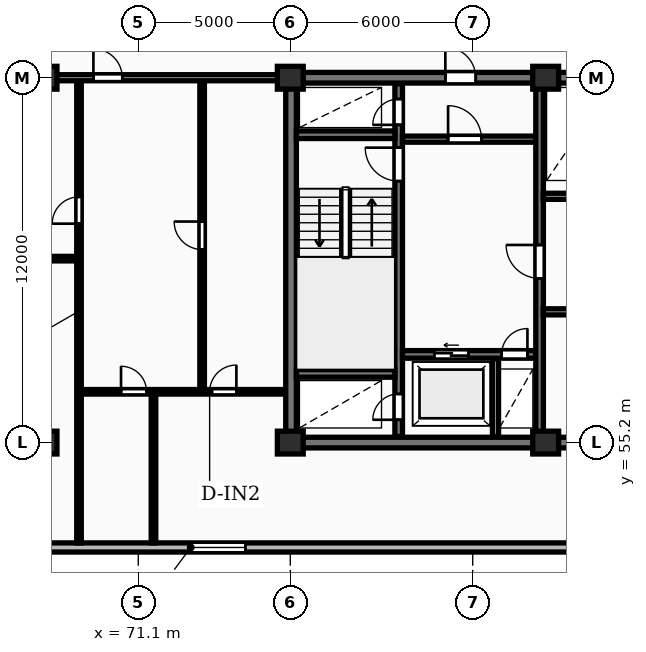
"""IFC4 building model, lengths in metres.
Left out: names, types, materials, properties, quantities, classifications, styles, units other than length and angle.
Written with IfcOpenShell. Run it as: python <this file> out.ifc"""

import sys

from ifc_helpers import new_model, si_unit, direction, frame, frame_2d, origin, origin_2d, place, context, subcontext, project, spatial, rectangle, extrude, element, fill, save


model = new_model("IFC4")
c1 = context("Model", 3, precision=1e-05, world=origin(), true_north=direction((0.0, 1.0)))
c2 = subcontext(c1, "Body", "Model", "MODEL_VIEW")
j1 = project(units=[si_unit("LENGTHUNIT", "METRE"), si_unit("PLANEANGLEUNIT", "RADIAN")], contexts=[c1])
p1 = place(None, origin())
s1 = spatial("IfcSite", under=j1, at=p1, CompositionType="ELEMENT")
p2 = place(p1, origin())
s2 = spatial("IfcBuilding", under=s1, at=p2, CompositionType="ELEMENT")
p3 = place(p2, frame((0.0, 0.0, 201.1)))
s3 = spatial("IfcBuildingStorey", under=s2, at=p3, CompositionType="ELEMENT", Elevation=201.1)
for number, where, z_axis, x_axis in (
    (1, (68.0, 55.2, 0.0), (0.0, 0.0, 1.0), (1.0, 0.0, 0.0)),
    (2, (68.0, 67.2, 0.0), (0.0, 0.0, 1.0), (1.0, 0.0, 0.0)),
    (3, (76.1, 55.2, 0.0), (0.0, 0.0, 1.0), (1.0, 0.0, 0.0)),
    (4, (76.1, 67.2, 0.0), (0.0, 0.0, 1.0), (1.0, 0.0, 0.0)),
    (5, (84.5, 55.2, 0.0), (0.0, 0.0, 1.0), (1.0, 0.0, 0.0)),
    (6, (84.5, 67.2, 0.0), (0.0, 0.0, 1.0), (1.0, 0.0, 0.0)),
):
    element("IfcColumn", number, at=place(p3, frame(where, z_axis=z_axis, x_axis=x_axis)), inside=s3, PredefinedType="COLUMN", context=c2, shape_type="SweptSolid", body=[
        extrude(rectangle(XDim=0.85, YDim=0.75, at=origin_2d()), origin(), (0.0, 0.0, 1.0), 3.25),
    ])
p4 = place(p3, frame((59.8, 51.75, 0.0), z_axis=(0.0, 0.0, 1.0), x_axis=(1.0, 0.0, 0.0)))
e7 = element("IfcWall", 7, at=p4, inside=s3, PredefinedType="STANDARD", context=c2, shape_type="SweptSolid", body=[
    extrude(rectangle(XDim=68.6, YDim=0.3, at=frame_2d((34.3, 0.0))), origin(), (0.0, 0.0, 1.0), 2.97),
])
p5 = place(p4, frame((13.025, 0.0, 0.85)))
e8 = element("IfcOpeningElement", 8, at=p5, cuts=e7, PredefinedType="OPENING", context=c2, shape_type="SweptSolid", body=[
    extrude(rectangle(XDim=1.8, YDim=1.8, at=frame_2d((0.9, 0.9))), frame((0.0, 0.16, 0.0), z_axis=(0.0, -1.0, 0.0), x_axis=(1.0, 0.0, 0.0)), (0.0, 0.0, 1.0), 0.32),
])
p6 = place(p4, frame((56.375, 0.0, 0.85)))
e9 = element("IfcOpeningElement", 9, at=p6, cuts=e7, PredefinedType="OPENING", context=c2, shape_type="SweptSolid", body=[
    extrude(rectangle(XDim=1.8, YDim=1.8, at=frame_2d((0.9, 0.9))), frame((0.0, 0.16, 0.0), z_axis=(0.0, -1.0, 0.0), x_axis=(1.0, 0.0, 0.0)), (0.0, 0.0, 1.0), 0.32),
])
p7 = place(p3, frame((75.95, 55.2, 0.0), z_axis=(0.0, 0.0, 1.0), x_axis=(1.0, 0.0, 0.0)))
e10 = element("IfcWall", 10, at=p7, inside=s3, PredefinedType="SHEAR", context=c2, shape_type="SweptSolid", body=[
    extrude(rectangle(XDim=36.3, YDim=0.35, at=frame_2d((18.15, 0.0))), origin(), (0.0, 0.0, 1.0), 3.25),
])
p8 = place(p3, frame((76.125, 55.375, 0.0), z_axis=(0.0, 0.0, 1.0), x_axis=(0.0, 1.0, 0.0)))
e11 = element("IfcWall", 11, at=p8, inside=s3, PredefinedType="SHEAR", context=c2, shape_type="SweptSolid", body=[
    extrude(rectangle(XDim=11.65, YDim=0.35, at=frame_2d((5.825, 0.0))), origin(), (0.0, 0.0, 1.0), 3.25),
])
p9 = place(p3, frame((75.95, 67.2, 0.0), z_axis=(0.0, 0.0, 1.0), x_axis=(1.0, 0.0, 0.0)))
e12 = element("IfcWall", 12, at=p9, inside=s3, PredefinedType="SHEAR", context=c2, shape_type="SweptSolid", body=[
    extrude(rectangle(XDim=36.3, YDim=0.35, at=frame_2d((18.15, 0.0))), origin(), (0.0, 0.0, 1.0), 3.25),
])
p10 = place(p9, frame((5.25, 0.0, 0.0)))
e13 = element("IfcOpeningElement", 13, at=p10, cuts=e12, PredefinedType="OPENING", context=c2, shape_type="SweptSolid", body=[
    extrude(rectangle(XDim=1.0, YDim=2.15, at=frame_2d((0.5, 1.075))), frame((0.0, 0.185, 0.0), z_axis=(0.0, -1.0, 0.0), x_axis=(1.0, 0.0, 0.0)), (0.0, 0.0, 1.0), 0.37),
])
p11 = place(p9, frame((21.6, 0.0, 0.0)))
e14 = element("IfcOpeningElement", 14, at=p11, cuts=e12, PredefinedType="OPENING", context=c2, shape_type="SweptSolid", body=[
    extrude(rectangle(XDim=1.5, YDim=2.2, at=frame_2d((0.75, 1.1))), frame((0.0, 0.185, 0.0), z_axis=(0.0, -1.0, 0.0), x_axis=(1.0, 0.0, 0.0)), (0.0, 0.0, 1.0), 0.37),
])
p12 = place(p9, frame((30.45, 0.0, 0.0)))
e15 = element("IfcOpeningElement", 15, at=p12, cuts=e12, PredefinedType="OPENING", context=c2, shape_type="SweptSolid", body=[
    extrude(rectangle(XDim=1.0, YDim=2.15, at=frame_2d((0.5, 1.075))), frame((0.0, 0.185, 0.0), z_axis=(0.0, -1.0, 0.0), x_axis=(1.0, 0.0, 0.0)), (0.0, 0.0, 1.0), 0.37),
])
p13 = place(p3, frame((79.665, 55.4, 0.0), z_axis=(0.0, 0.0, 1.0), x_axis=(0.0, 1.0, 0.0)))
e16 = element("IfcWall", 16, at=p13, inside=s3, PredefinedType="SHEAR", context=c2, shape_type="SweptSolid", body=[
    extrude(rectangle(XDim=11.6, YDim=0.25, at=frame_2d((5.8, 0.0))), origin(), (0.0, 0.0, 1.0), 3.25),
])
p14 = place(p13, frame((0.55, 0.0, 0.0)))
e17 = element("IfcOpeningElement", 17, at=p14, cuts=e16, PredefinedType="OPENING", context=c2, shape_type="SweptSolid", body=[
    extrude(rectangle(XDim=0.85, YDim=2.05, at=frame_2d((0.425, 1.025))), frame((0.0, 0.135, 0.0), z_axis=(0.0, -1.0, 0.0), x_axis=(1.0, 0.0, 0.0)), (0.0, 0.0, 1.0), 0.27),
])
p15 = place(p13, frame((8.4, 0.0, 0.0)))
e18 = element("IfcOpeningElement", 18, at=p15, cuts=e16, PredefinedType="OPENING", context=c2, shape_type="SweptSolid", body=[
    extrude(rectangle(XDim=1.1, YDim=2.1, at=frame_2d((0.55, 1.05))), frame((0.0, 0.135, 0.0), z_axis=(0.0, -1.0, 0.0), x_axis=(1.0, 0.0, 0.0)), (0.0, 0.0, 1.0), 0.27),
])
p16 = place(p13, frame((10.25, 0.0, 0.0)))
e19 = element("IfcOpeningElement", 19, at=p16, cuts=e16, PredefinedType="OPENING", context=c2, shape_type="SweptSolid", body=[
    extrude(rectangle(XDim=0.85, YDim=2.05, at=frame_2d((0.425, 1.025))), frame((0.0, 0.135, 0.0), z_axis=(0.0, -1.0, 0.0), x_axis=(1.0, 0.0, 0.0)), (0.0, 0.0, 1.0), 0.27),
])
for number, where, z_axis, x_axis in (
    (20, (76.3, 57.475, 0.0), (0.0, 0.0, 1.0), (1.0, 0.0, 0.0)),
    (21, (76.3, 65.325, 0.0), (0.0, 0.0, 1.0), (1.0, 0.0, 0.0)),
):
    element("IfcWall", number, at=place(p3, frame(where, z_axis=z_axis, x_axis=x_axis)), inside=s3, PredefinedType="SHEAR", context=c2, shape_type="SweptSolid", body=[
        extrude(rectangle(XDim=3.24, YDim=0.25, at=frame_2d((1.62, 0.0))), origin(), (0.0, 0.0, 1.0), 3.25),
    ])
p17 = place(p3, frame((79.79, 58.1, 0.0), z_axis=(0.0, 0.0, 1.0), x_axis=(1.0, 0.0, 0.0)))
e22 = element("IfcWall", 22, at=p17, inside=s3, PredefinedType="SHEAR", context=c2, shape_type="SweptSolid", body=[
    extrude(rectangle(XDim=4.39, YDim=0.25, at=frame_2d((2.195, 0.0))), origin(), (0.0, 0.0, 1.0), 3.25),
])
p18 = place(p17, frame((1.05, 0.0, 0.0)))
e23 = element("IfcOpeningElement", 23, at=p18, cuts=e22, PredefinedType="OPENING", context=c2, shape_type="SweptSolid", body=[
    extrude(rectangle(XDim=1.12, YDim=2.12, at=frame_2d((0.56, 1.06))), frame((0.0, 0.135, 0.0), z_axis=(0.0, -1.0, 0.0), x_axis=(1.0, 0.0, 0.0)), (0.0, 0.0, 1.0), 0.27),
])
p19 = place(p17, frame((3.26, 0.0, 0.0)))
e24 = element("IfcOpeningElement", 24, at=p19, cuts=e22, PredefinedType="OPENING", context=c2, shape_type="SweptSolid", body=[
    extrude(rectangle(XDim=0.85, YDim=2.05, at=frame_2d((0.425, 1.025))), frame((0.0, 0.135, 0.0), z_axis=(0.0, -1.0, 0.0), x_axis=(1.0, 0.0, 0.0)), (0.0, 0.0, 1.0), 0.27),
])
p20 = place(p3, frame((82.85, 55.4, 0.0), z_axis=(0.0, 0.0, 1.0), x_axis=(0.0, 1.0, 0.0)))
e25 = element("IfcWall", 25, at=p20, inside=s3, PredefinedType="PARTITIONING", context=c2, shape_type="SweptSolid", body=[
    extrude(rectangle(XDim=2.56, YDim=0.2, at=frame_2d((1.28, 0.0))), origin(), (0.0, 0.0, 1.0), 2.97),
])
p21 = place(p3, frame((79.79, 65.18, 0.0), z_axis=(0.0, 0.0, 1.0), x_axis=(1.0, 0.0, 0.0)))
e26 = element("IfcWall", 26, at=p21, inside=s3, PredefinedType="PARTITIONING", context=c2, shape_type="SweptSolid", body=[
    extrude(rectangle(XDim=4.39, YDim=0.2, at=frame_2d((2.195, 0.0))), origin(), (0.0, 0.0, 1.0), 2.97),
])
p22 = place(p21, frame((1.5, 0.0, 0.0)))
e27 = element("IfcOpeningElement", 27, at=p22, cuts=e26, PredefinedType="OPENING", context=c2, shape_type="SweptSolid", body=[
    extrude(rectangle(XDim=1.1, YDim=2.1, at=frame_2d((0.55, 1.05))), frame((0.0, 0.11, 0.0), z_axis=(0.0, -1.0, 0.0), x_axis=(1.0, 0.0, 0.0)), (0.0, 0.0, 1.0), 0.22),
])
p23 = place(p3, frame((84.3, 55.4, 0.0), z_axis=(0.0, 0.0, 1.0), x_axis=(0.0, 1.0, 0.0)))
e28 = element("IfcWall", 28, at=p23, inside=s3, PredefinedType="SHEAR", context=c2, shape_type="SweptSolid", body=[
    extrude(rectangle(XDim=11.6, YDim=0.25, at=frame_2d((5.8, 0.0))), origin(), (0.0, 0.0, 1.0), 3.25),
])
p24 = place(p23, frame((5.2, 0.0, 0.0)))
e29 = element("IfcOpeningElement", 29, at=p24, cuts=e28, PredefinedType="OPENING", context=c2, shape_type="SweptSolid", body=[
    extrude(rectangle(XDim=1.1, YDim=2.1, at=frame_2d((0.55, 1.05))), frame((0.0, 0.135, 0.0), z_axis=(0.0, -1.0, 0.0), x_axis=(1.0, 0.0, 0.0)), (0.0, 0.0, 1.0), 0.27),
])
p25 = place(p3, frame((84.42, 59.5, 0.0), z_axis=(0.0, 0.0, 1.0), x_axis=(1.0, 0.0, 0.0)))
e30 = element("IfcWall", 30, at=p25, inside=s3, PredefinedType="PARTITIONING", context=c2, shape_type="SweptSolid", body=[
    extrude(rectangle(XDim=8.36, YDim=0.2, at=frame_2d((4.18, 0.0))), origin(), (0.0, 0.0, 1.0), 2.97),
])
p26 = place(p25, frame((3.4, 0.0, 0.0)))
e31 = element("IfcOpeningElement", 31, at=p26, cuts=e30, PredefinedType="OPENING", context=c2, shape_type="SweptSolid", body=[
    extrude(rectangle(XDim=0.92, YDim=2.08, at=frame_2d((0.46, 1.04))), frame((0.0, 0.11, 0.0), z_axis=(0.0, -1.0, 0.0), x_axis=(1.0, 0.0, 0.0)), (0.0, 0.0, 1.0), 0.22),
])
p27 = place(p3, frame((84.42, 63.3, 0.0), z_axis=(0.0, 0.0, 1.0), x_axis=(1.0, 0.0, 0.0)))
e32 = element("IfcWall", 32, at=p27, inside=s3, PredefinedType="PARTITIONING", context=c2, shape_type="SweptSolid", body=[
    extrude(rectangle(XDim=19.83, YDim=0.2, at=frame_2d((9.915, 0.0))), origin(), (0.0, 0.0, 1.0), 2.97),
])
p28 = place(p27, frame((1.15, 0.0, 0.0)))
e33 = element("IfcOpeningElement", 33, at=p28, cuts=e32, PredefinedType="OPENING", context=c2, shape_type="SweptSolid", body=[
    extrude(rectangle(XDim=0.85, YDim=2.05, at=frame_2d((0.425, 1.025))), frame((0.0, 0.11, 0.0), z_axis=(0.0, -1.0, 0.0), x_axis=(1.0, 0.0, 0.0)), (0.0, 0.0, 1.0), 0.22),
])
p29 = place(p27, frame((3.25, 0.0, 0.0)))
e34 = element("IfcOpeningElement", 34, at=p29, cuts=e32, PredefinedType="OPENING", context=c2, shape_type="SweptSolid", body=[
    extrude(rectangle(XDim=0.85, YDim=2.05, at=frame_2d((0.425, 1.025))), frame((0.0, 0.11, 0.0), z_axis=(0.0, -1.0, 0.0), x_axis=(1.0, 0.0, 0.0)), (0.0, 0.0, 1.0), 0.22),
])
p30 = place(p27, frame((13.08, 0.0, 0.0)))
e35 = element("IfcOpeningElement", 35, at=p30, cuts=e32, PredefinedType="OPENING", context=c2, shape_type="SweptSolid", body=[
    extrude(rectangle(XDim=1.5, YDim=2.2, at=frame_2d((0.75, 1.1))), frame((0.0, 0.11, 0.0), z_axis=(0.0, -1.0, 0.0), x_axis=(1.0, 0.0, 0.0)), (0.0, 0.0, 1.0), 0.22),
])
p31 = place(p27, frame((5.53, 0.0, 0.0)))
e36 = element("IfcOpeningElement", 36, at=p31, cuts=e32, PredefinedType="OPENING", context=c2, shape_type="SweptSolid", body=[
    extrude(rectangle(XDim=0.88, YDim=2.06, at=frame_2d((0.44, 1.03))), frame((0.0, 0.11, 0.0), z_axis=(0.0, -1.0, 0.0), x_axis=(1.0, 0.0, 0.0)), (0.0, 0.0, 1.0), 0.22),
])
p32 = place(p27, frame((7.68, 0.0, 0.0)))
e37 = element("IfcOpeningElement", 37, at=p32, cuts=e32, PredefinedType="OPENING", context=c2, shape_type="SweptSolid", body=[
    extrude(rectangle(XDim=0.88, YDim=2.06, at=frame_2d((0.44, 1.03))), frame((0.0, 0.11, 0.0), z_axis=(0.0, -1.0, 0.0), x_axis=(1.0, 0.0, 0.0)), (0.0, 0.0, 1.0), 0.22),
])
p33 = place(p27, frame((10.43, 0.0, 0.0)))
e38 = element("IfcOpeningElement", 38, at=p33, cuts=e32, PredefinedType="OPENING", context=c2, shape_type="SweptSolid", body=[
    extrude(rectangle(XDim=0.85, YDim=2.05, at=frame_2d((0.425, 1.025))), frame((0.0, 0.11, 0.0), z_axis=(0.0, -1.0, 0.0), x_axis=(1.0, 0.0, 0.0)), (0.0, 0.0, 1.0), 0.22),
])
p34 = place(p27, frame((16.23, 0.0, 0.0)))
e39 = element("IfcOpeningElement", 39, at=p34, cuts=e32, PredefinedType="OPENING", context=c2, shape_type="SweptSolid", body=[
    extrude(rectangle(XDim=0.96, YDim=2.1, at=frame_2d((0.48, 1.05))), frame((0.0, 0.11, 0.0), z_axis=(0.0, -1.0, 0.0), x_axis=(1.0, 0.0, 0.0)), (0.0, 0.0, 1.0), 0.22),
])
p35 = place(p27, frame((18.68, 0.0, 0.0)))
e40 = element("IfcOpeningElement", 40, at=p35, cuts=e32, PredefinedType="OPENING", context=c2, shape_type="SweptSolid", body=[
    extrude(rectangle(XDim=0.84, YDim=2.04, at=frame_2d((0.42, 1.02))), frame((0.0, 0.11, 0.0), z_axis=(0.0, -1.0, 0.0), x_axis=(1.0, 0.0, 0.0)), (0.0, 0.0, 1.0), 0.22),
])
p36 = place(p3, frame((59.8, 61.25, 0.0), z_axis=(0.0, 0.0, 1.0), x_axis=(1.0, 0.0, 0.0)))
e41 = element("IfcWall", 41, at=p36, inside=s3, PredefinedType="PARTITIONING", context=c2, shape_type="SweptSolid", body=[
    extrude(rectangle(XDim=9.35, YDim=0.15, at=frame_2d((4.675, 0.0))), origin(), (0.0, 0.0, 1.0), 2.97),
])
p37 = place(p36, frame((4.255, 0.0, 0.0)))
e42 = element("IfcOpeningElement", 42, at=p37, cuts=e41, PredefinedType="OPENING", context=c2, shape_type="SweptSolid", body=[
    extrude(rectangle(XDim=0.84, YDim=2.04, at=frame_2d((0.42, 1.02))), frame((0.0, 0.085, 0.0), z_axis=(0.0, -1.0, 0.0), x_axis=(1.0, 0.0, 0.0)), (0.0, 0.0, 1.0), 0.17),
])
p38 = place(p3, frame((69.15, 51.9, 0.0), z_axis=(0.0, 0.0, 1.0), x_axis=(0.0, 1.0, 0.0)))
e43 = element("IfcWall", 43, at=p38, inside=s3, PredefinedType="PARTITIONING", context=c2, shape_type="SweptSolid", body=[
    extrude(rectangle(XDim=15.25, YDim=0.15, at=frame_2d((7.625, 0.0))), origin(), (0.0, 0.0, 1.0), 2.97),
])
p39 = place(p38, frame((10.5, 0.0, 0.0)))
e44 = element("IfcOpeningElement", 44, at=p39, cuts=e43, PredefinedType="OPENING", context=c2, shape_type="SweptSolid", body=[
    extrude(rectangle(XDim=0.88, YDim=2.06, at=frame_2d((0.44, 1.03))), frame((0.0, 0.085, 0.0), z_axis=(0.0, -1.0, 0.0), x_axis=(1.0, 0.0, 0.0)), (0.0, 0.0, 1.0), 0.17),
])
p40 = place(p3, frame((73.2, 56.87, 0.0), z_axis=(0.0, 0.0, 1.0), x_axis=(0.0, 1.0, 0.0)))
e45 = element("IfcWall", 45, at=p40, inside=s3, PredefinedType="PARTITIONING", context=c2, shape_type="SweptSolid", body=[
    extrude(rectangle(XDim=10.28, YDim=0.15, at=frame_2d((5.14, 0.0))), origin(), (0.0, 0.0, 1.0), 2.97),
])
p41 = place(p40, frame((4.68, 0.0, 0.0)))
e46 = element("IfcOpeningElement", 46, at=p41, cuts=e45, PredefinedType="OPENING", context=c2, shape_type="SweptSolid", body=[
    extrude(rectangle(XDim=0.92, YDim=2.08, at=frame_2d((0.46, 1.04))), frame((0.0, 0.085, 0.0), z_axis=(0.0, -1.0, 0.0), x_axis=(1.0, 0.0, 0.0)), (0.0, 0.0, 1.0), 0.17),
])
p42 = place(p3, frame((71.6, 51.9, 0.0), z_axis=(0.0, 0.0, 1.0), x_axis=(0.0, 1.0, 0.0)))
e47 = element("IfcWall", 47, at=p42, inside=s3, PredefinedType="PARTITIONING", context=c2, shape_type="SweptSolid", body=[
    extrude(rectangle(XDim=4.97, YDim=0.15, at=frame_2d((2.485, 0.0))), origin(), (0.0, 0.0, 1.0), 2.97),
])
p43 = place(p3, frame((69.17, 56.87, 0.0), z_axis=(0.0, 0.0, 1.0), x_axis=(1.0, 0.0, 0.0)))
e48 = element("IfcWall", 48, at=p43, inside=s3, PredefinedType="PARTITIONING", context=c2, shape_type="SweptSolid", body=[
    extrude(rectangle(XDim=6.76, YDim=0.15, at=frame_2d((3.38, 0.0))), origin(), (0.0, 0.0, 1.0), 2.97),
])
p44 = place(p43, frame((1.362, 0.0, 0.0)))
e49 = element("IfcOpeningElement", 49, at=p44, cuts=e48, PredefinedType="OPENING", context=c2, shape_type="SweptSolid", body=[
    extrude(rectangle(XDim=0.84, YDim=2.04, at=frame_2d((0.42, 1.02))), frame((0.0, 0.085, 0.0), z_axis=(0.0, -1.0, 0.0), x_axis=(1.0, 0.0, 0.0)), (0.0, 0.0, 1.0), 0.17),
])
p45 = place(p43, frame((4.277, 0.0, 0.0)))
e50 = element("IfcOpeningElement", 50, at=p45, cuts=e48, PredefinedType="OPENING", context=c2, shape_type="SweptSolid", body=[
    extrude(rectangle(XDim=0.88, YDim=2.06, at=frame_2d((0.44, 1.03))), frame((0.0, 0.085, 0.0), z_axis=(0.0, -1.0, 0.0), x_axis=(1.0, 0.0, 0.0)), (0.0, 0.0, 1.0), 0.17),
])
p46 = place(p3, frame((59.8, 67.2, 0.0), z_axis=(0.0, 0.0, 1.0), x_axis=(1.0, 0.0, 0.0)))
e51 = element("IfcWall", 51, at=p46, inside=s3, PredefinedType="PARTITIONING", context=c2, shape_type="SweptSolid", body=[
    extrude(rectangle(XDim=16.15, YDim=0.2, at=frame_2d((8.075, 0.0))), origin(), (0.0, 0.0, 1.0), 2.433),
])
p47 = place(p46, frame((9.823, 0.0, 0.0)))
e52 = element("IfcOpeningElement", 52, at=p47, cuts=e51, PredefinedType="OPENING", context=c2, shape_type="SweptSolid", body=[
    extrude(rectangle(XDim=0.95, YDim=2.15, at=frame_2d((0.475, 1.075))), frame((0.0, 0.11, 0.0), z_axis=(0.0, -1.0, 0.0), x_axis=(1.0, 0.0, 0.0)), (0.0, 0.0, 1.0), 0.22),
])
p48 = place(p5, origin())
e53 = element("IfcWindow", 53, at=p48, inside=s3, PartitioningType="SINGLE_PANEL", PredefinedType="WINDOW", context=c2, shape_type="SweptSolid", body=[
    extrude(rectangle(XDim=1.8, YDim=1.8, at=frame_2d((0.9, 0.9))), frame((0.0, 0.03, 0.0), z_axis=(0.0, -1.0, 0.0), x_axis=(1.0, 0.0, 0.0)), (0.0, 0.0, 1.0), 0.06),
])
fill(e8, e53)
p49 = place(p10, origin())
e54 = element("IfcDoor", 54, at=p49, inside=s3, OperationType="SINGLE_SWING_LEFT", PredefinedType="DOOR", context=c2, shape_type="SweptSolid", body=[
    extrude(rectangle(XDim=1.0, YDim=2.15, at=frame_2d((0.5, 1.075))), frame((0.0, 0.025, 0.0), z_axis=(0.0, -1.0, 0.0), x_axis=(1.0, 0.0, 0.0)), (0.0, 0.0, 1.0), 0.05),
])
fill(e13, e54)
p50 = place(p14, origin())
e55 = element("IfcDoor", 55, at=p50, inside=s3, OperationType="SINGLE_SWING_LEFT", PredefinedType="DOOR", context=c2, shape_type="SweptSolid", body=[
    extrude(rectangle(XDim=0.85, YDim=2.05, at=frame_2d((0.425, 1.025))), frame((0.0, 0.025, 0.0), z_axis=(0.0, -1.0, 0.0), x_axis=(1.0, 0.0, 0.0)), (0.0, 0.0, 1.0), 0.05),
])
fill(e17, e55)
p51 = place(p15, origin())
e56 = element("IfcDoor", 56, at=p51, inside=s3, OperationType="SINGLE_SWING_RIGHT", PredefinedType="DOOR", context=c2, shape_type="SweptSolid", body=[
    extrude(rectangle(XDim=1.1, YDim=2.1, at=frame_2d((0.55, 1.05))), frame((0.0, 0.025, 0.0), z_axis=(0.0, -1.0, 0.0), x_axis=(1.0, 0.0, 0.0)), (0.0, 0.0, 1.0), 0.05),
])
fill(e18, e56)
p52 = place(p16, origin())
e57 = element("IfcDoor", 57, at=p52, inside=s3, OperationType="SINGLE_SWING_LEFT", PredefinedType="DOOR", context=c2, shape_type="SweptSolid", body=[
    extrude(rectangle(XDim=0.85, YDim=2.05, at=frame_2d((0.425, 1.025))), frame((0.0, 0.025, 0.0), z_axis=(0.0, -1.0, 0.0), x_axis=(1.0, 0.0, 0.0)), (0.0, 0.0, 1.0), 0.05),
])
fill(e19, e57)
p53 = place(p18, origin())
e58 = element("IfcDoor", 58, at=p53, inside=s3, OperationType="SLIDING_TO_LEFT", PredefinedType="DOOR", context=c2, shape_type="SweptSolid", body=[
    extrude(rectangle(XDim=1.12, YDim=2.12, at=frame_2d((0.56, 1.06))), frame((0.0, 0.025, 0.0), z_axis=(0.0, -1.0, 0.0), x_axis=(1.0, 0.0, 0.0)), (0.0, 0.0, 1.0), 0.05),
])
fill(e23, e58)
p54 = place(p19, origin())
e59 = element("IfcDoor", 59, at=p54, inside=s3, OperationType="SINGLE_SWING_RIGHT", PredefinedType="DOOR", context=c2, shape_type="SweptSolid", body=[
    extrude(rectangle(XDim=0.85, YDim=2.05, at=frame_2d((0.425, 1.025))), frame((0.0, 0.025, 0.0), z_axis=(0.0, -1.0, 0.0), x_axis=(1.0, 0.0, 0.0)), (0.0, 0.0, 1.0), 0.05),
])
fill(e24, e59)
p55 = place(p22, origin())
e60 = element("IfcDoor", 60, at=p55, inside=s3, OperationType="SINGLE_SWING_LEFT", PredefinedType="DOOR", context=c2, shape_type="SweptSolid", body=[
    extrude(rectangle(XDim=1.1, YDim=2.1, at=frame_2d((0.55, 1.05))), frame((0.0, 0.025, 0.0), z_axis=(0.0, -1.0, 0.0), x_axis=(1.0, 0.0, 0.0)), (0.0, 0.0, 1.0), 0.05),
])
fill(e27, e60)
p56 = place(p24, origin())
e61 = element("IfcDoor", 61, at=p56, inside=s3, OperationType="SINGLE_SWING_RIGHT", PredefinedType="DOOR", context=c2, shape_type="SweptSolid", body=[
    extrude(rectangle(XDim=1.1, YDim=2.1, at=frame_2d((0.55, 1.05))), frame((0.0, 0.025, 0.0), z_axis=(0.0, -1.0, 0.0), x_axis=(1.0, 0.0, 0.0)), (0.0, 0.0, 1.0), 0.05),
])
fill(e29, e61)
p57 = place(p39, origin())
e62 = element("IfcDoor", 62, at=p57, inside=s3, OperationType="SINGLE_SWING_LEFT", PredefinedType="DOOR", context=c2, shape_type="SweptSolid", body=[
    extrude(rectangle(XDim=0.88, YDim=2.06, at=frame_2d((0.44, 1.03))), frame((0.0, 0.025, 0.0), z_axis=(0.0, -1.0, 0.0), x_axis=(1.0, 0.0, 0.0)), (0.0, 0.0, 1.0), 0.05),
])
fill(e44, e62)
p58 = place(p41, origin())
e63 = element("IfcDoor", 63, at=p58, inside=s3, OperationType="SINGLE_SWING_RIGHT", PredefinedType="DOOR", context=c2, shape_type="SweptSolid", body=[
    extrude(rectangle(XDim=0.92, YDim=2.08, at=frame_2d((0.46, 1.04))), frame((0.0, 0.025, 0.0), z_axis=(0.0, -1.0, 0.0), x_axis=(1.0, 0.0, 0.0)), (0.0, 0.0, 1.0), 0.05),
])
fill(e46, e63)
p59 = place(p44, origin())
e64 = element("IfcDoor", 64, at=p59, inside=s3, OperationType="SINGLE_SWING_LEFT", PredefinedType="DOOR", context=c2, shape_type="SweptSolid", body=[
    extrude(rectangle(XDim=0.84, YDim=2.04, at=frame_2d((0.42, 1.02))), frame((0.0, 0.025, 0.0), z_axis=(0.0, -1.0, 0.0), x_axis=(1.0, 0.0, 0.0)), (0.0, 0.0, 1.0), 0.05),
])
fill(e49, e64)
p60 = place(p45, origin())
e65 = element("IfcDoor", 65, at=p60, inside=s3, OperationType="SINGLE_SWING_RIGHT", PredefinedType="DOOR", context=c2, shape_type="SweptSolid", body=[
    extrude(rectangle(XDim=0.88, YDim=2.06, at=frame_2d((0.44, 1.03))), frame((0.0, 0.025, 0.0), z_axis=(0.0, -1.0, 0.0), x_axis=(1.0, 0.0, 0.0)), (0.0, 0.0, 1.0), 0.05),
])
fill(e50, e65)
p61 = place(p47, origin())
e66 = element("IfcDoor", 66, at=p61, inside=s3, OperationType="SINGLE_SWING_LEFT", PredefinedType="DOOR", context=c2, shape_type="SweptSolid", body=[
    extrude(rectangle(XDim=0.95, YDim=2.15, at=frame_2d((0.475, 1.075))), frame((0.0, 0.025, 0.0), z_axis=(0.0, -1.0, 0.0), x_axis=(1.0, 0.0, 0.0)), (0.0, 0.0, 1.0), 0.05),
])
fill(e52, e66)
save(model, sys.argv[1])
